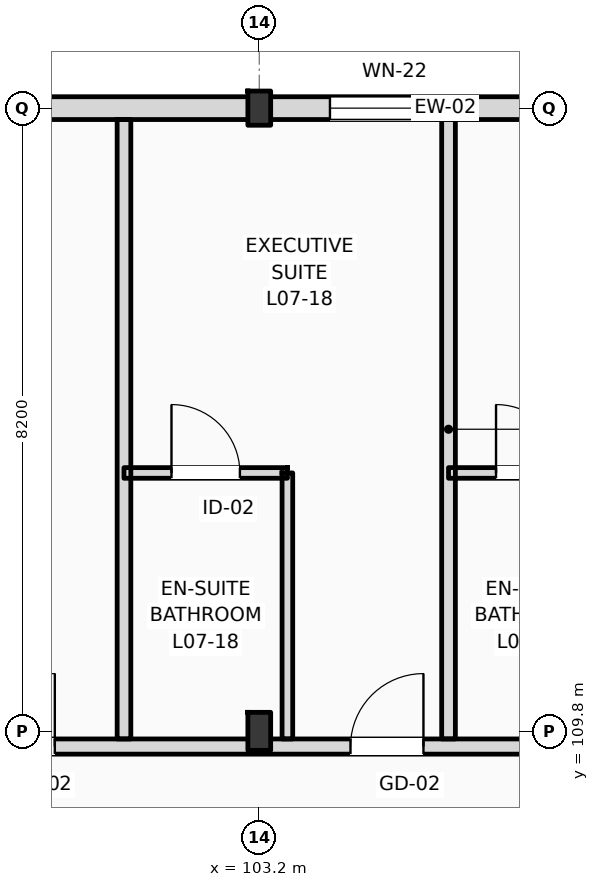
"""IFC4 building model, lengths in metres.
Left out: names, types, materials, properties, quantities, classifications, styles, units other than length and angle.
Written with IfcOpenShell. Run it as: python <this file> out.ifc"""

import sys

from ifc_helpers import new_model, si_unit, direction, frame, frame_2d, origin, origin_2d, place, context, subcontext, project, spatial, rectangle, i_section, extrude, element, fill, save


model = new_model("IFC4")
c1 = context("Model", 3, precision=1e-05, world=origin(), true_north=direction((0.0, 1.0)))
c2 = subcontext(c1, "Body", "Model", "MODEL_VIEW")
j1 = project(units=[si_unit("LENGTHUNIT", "METRE"), si_unit("PLANEANGLEUNIT", "RADIAN")], contexts=[c1])
p1 = place(None, origin())
s1 = spatial("IfcSite", under=j1, at=p1, CompositionType="ELEMENT")
p2 = place(p1, origin())
s2 = spatial("IfcBuilding", under=s1, at=p2, CompositionType="ELEMENT")
p3 = place(p2, frame((0.0, 0.0, 31.8)))
s3 = spatial("IfcBuildingStorey", under=s2, at=p3, CompositionType="ELEMENT", Elevation=31.8)
p4 = place(p3, frame((103.2, 109.8, 0.0), z_axis=(0.0, 0.0, 1.0), x_axis=(1.0, 0.0, 0.0)))
e1 = element("IfcColumn", 1, at=p4, inside=s3, PredefinedType="COLUMN", context=c2, shape_type="SweptSolid", body=[
    extrude(i_section(OverallWidth=0.3, OverallDepth=0.5, WebThickness=0.014, FlangeThickness=0.028, FilletRadius=0.027, at=origin_2d()), origin(), (0.0, 0.0, 1.0), 3.6),
])
p5 = place(p3, frame((103.2, 118.0, 0.0), z_axis=(0.0, 0.0, 1.0), x_axis=(1.0, 0.0, 0.0)))
e2 = element("IfcColumn", 2, at=p5, inside=s3, PredefinedType="COLUMN", context=c2, shape_type="SweptSolid", body=[
    extrude(i_section(OverallWidth=0.3, OverallDepth=0.45, WebThickness=0.014, FlangeThickness=0.026, FilletRadius=0.027, at=origin_2d()), origin(), (0.0, 0.0, 1.0), 3.6),
])
p6 = place(p3, frame((22.5, 118.0, 0.0), z_axis=(0.0, 0.0, 1.0), x_axis=(1.0, 0.0, 0.0)))
e3 = element("IfcWall", 3, at=p6, inside=s3, PredefinedType="STANDARD", context=c2, shape_type="SweptSolid", body=[
    extrude(rectangle(XDim=97.5, YDim=0.3, at=frame_2d((48.75, 0.0))), origin(), (0.0, 0.0, 1.0), 2.72),
])
p7 = place(p6, frame((3.61, 0.0, 0.9)))
e4 = element("IfcOpeningElement", 4, at=p7, cuts=e3, PredefinedType="OPENING", context=c2, shape_type="SweptSolid", body=[
    extrude(rectangle(XDim=1.1, YDim=1.64, at=frame_2d((0.55, 0.82))), frame((0.0, 0.16, 0.0), z_axis=(0.0, -1.0, 0.0), x_axis=(1.0, 0.0, 0.0)), (0.0, 0.0, 1.0), 0.32),
])
p8 = place(p6, frame((6.855, 0.0, 0.0)))
e5 = element("IfcOpeningElement", 5, at=p8, cuts=e3, PredefinedType="OPENING", context=c2, shape_type="SweptSolid", body=[
    extrude(rectangle(XDim=1.2, YDim=2.25, at=frame_2d((0.6, 1.125))), frame((0.0, 0.16, 0.0), z_axis=(0.0, -1.0, 0.0), x_axis=(1.0, 0.0, 0.0)), (0.0, 0.0, 1.0), 0.32),
])
p9 = place(p6, frame((11.405, 0.0, 0.9)))
e6 = element("IfcOpeningElement", 6, at=p9, cuts=e3, PredefinedType="OPENING", context=c2, shape_type="SweptSolid", body=[
    extrude(rectangle(XDim=2.1, YDim=1.64, at=frame_2d((1.05, 0.82))), frame((0.0, 0.16, 0.0), z_axis=(0.0, -1.0, 0.0), x_axis=(1.0, 0.0, 0.0)), (0.0, 0.0, 1.0), 0.32),
])
p10 = place(p6, frame((15.13, 0.0, 0.9)))
e7 = element("IfcOpeningElement", 7, at=p10, cuts=e3, PredefinedType="OPENING", context=c2, shape_type="SweptSolid", body=[
    extrude(rectangle(XDim=2.25, YDim=1.64, at=frame_2d((1.125, 0.82))), frame((0.0, 0.16, 0.0), z_axis=(0.0, -1.0, 0.0), x_axis=(1.0, 0.0, 0.0)), (0.0, 0.0, 1.0), 0.32),
])
p11 = place(p6, frame((21.53, 0.0, 0.0)))
e8 = element("IfcOpeningElement", 8, at=p11, cuts=e3, PredefinedType="OPENING", context=c2, shape_type="SweptSolid", body=[
    extrude(rectangle(XDim=1.2, YDim=2.25, at=frame_2d((0.6, 1.125))), frame((0.0, 0.16, 0.0), z_axis=(0.0, -1.0, 0.0), x_axis=(1.0, 0.0, 0.0)), (0.0, 0.0, 1.0), 0.32),
])
p12 = place(p6, frame((24.18, 0.0, 0.9)))
e9 = element("IfcOpeningElement", 9, at=p12, cuts=e3, PredefinedType="OPENING", context=c2, shape_type="SweptSolid", body=[
    extrude(rectangle(XDim=1.1, YDim=1.64, at=frame_2d((0.55, 0.82))), frame((0.0, 0.16, 0.0), z_axis=(0.0, -1.0, 0.0), x_axis=(1.0, 0.0, 0.0)), (0.0, 0.0, 1.0), 0.32),
])
p13 = place(p6, frame((29.105, 0.0, 0.9)))
e10 = element("IfcOpeningElement", 10, at=p13, cuts=e3, PredefinedType="OPENING", context=c2, shape_type="SweptSolid", body=[
    extrude(rectangle(XDim=2.7, YDim=1.64, at=frame_2d((1.35, 0.82))), frame((0.0, 0.16, 0.0), z_axis=(0.0, -1.0, 0.0), x_axis=(1.0, 0.0, 0.0)), (0.0, 0.0, 1.0), 0.32),
])
p14 = place(p6, frame((34.83, 0.0, 0.9)))
e11 = element("IfcOpeningElement", 11, at=p14, cuts=e3, PredefinedType="OPENING", context=c2, shape_type="SweptSolid", body=[
    extrude(rectangle(XDim=1.8, YDim=1.64, at=frame_2d((0.9, 0.82))), frame((0.0, 0.16, 0.0), z_axis=(0.0, -1.0, 0.0), x_axis=(1.0, 0.0, 0.0)), (0.0, 0.0, 1.0), 0.32),
])
p15 = place(p6, frame((38.525, 0.0, 0.0)))
e12 = element("IfcOpeningElement", 12, at=p15, cuts=e3, PredefinedType="OPENING", context=c2, shape_type="SweptSolid", body=[
    extrude(rectangle(XDim=1.2, YDim=2.25, at=frame_2d((0.6, 1.125))), frame((0.0, 0.16, 0.0), z_axis=(0.0, -1.0, 0.0), x_axis=(1.0, 0.0, 0.0)), (0.0, 0.0, 1.0), 0.32),
])
p16 = place(p6, frame((42.73, 0.0, 0.9)))
e13 = element("IfcOpeningElement", 13, at=p16, cuts=e3, PredefinedType="OPENING", context=c2, shape_type="SweptSolid", body=[
    extrude(rectangle(XDim=3.05, YDim=1.64, at=frame_2d((1.525, 0.82))), frame((0.0, 0.16, 0.0), z_axis=(0.0, -1.0, 0.0), x_axis=(1.0, 0.0, 0.0)), (0.0, 0.0, 1.0), 0.32),
])
p17 = place(p6, frame((47.155, 0.0, 0.9)))
e14 = element("IfcOpeningElement", 14, at=p17, cuts=e3, PredefinedType="OPENING", context=c2, shape_type="SweptSolid", body=[
    extrude(rectangle(XDim=1.35, YDim=1.64, at=frame_2d((0.675, 0.82))), frame((0.0, 0.16, 0.0), z_axis=(0.0, -1.0, 0.0), x_axis=(1.0, 0.0, 0.0)), (0.0, 0.0, 1.0), 0.32),
])
p18 = place(p6, frame((53.065, 0.0, 0.0)))
e15 = element("IfcOpeningElement", 15, at=p18, cuts=e3, PredefinedType="OPENING", context=c2, shape_type="SweptSolid", body=[
    extrude(rectangle(XDim=1.2, YDim=2.25, at=frame_2d((0.6, 1.125))), frame((0.0, 0.16, 0.0), z_axis=(0.0, -1.0, 0.0), x_axis=(1.0, 0.0, 0.0)), (0.0, 0.0, 1.0), 0.32),
])
p19 = place(p6, frame((58.2, 0.0, 0.9)))
e16 = element("IfcOpeningElement", 16, at=p19, cuts=e3, PredefinedType="OPENING", context=c2, shape_type="SweptSolid", body=[
    extrude(rectangle(XDim=1.8, YDim=1.64, at=frame_2d((0.9, 0.82))), frame((0.0, 0.16, 0.0), z_axis=(0.0, -1.0, 0.0), x_axis=(1.0, 0.0, 0.0)), (0.0, 0.0, 1.0), 0.32),
])
p20 = place(p6, frame((61.13, 0.0, 0.9)))
e17 = element("IfcOpeningElement", 17, at=p20, cuts=e3, PredefinedType="OPENING", context=c2, shape_type="SweptSolid", body=[
    extrude(rectangle(XDim=3.05, YDim=1.64, at=frame_2d((1.525, 0.82))), frame((0.0, 0.16, 0.0), z_axis=(0.0, -1.0, 0.0), x_axis=(1.0, 0.0, 0.0)), (0.0, 0.0, 1.0), 0.32),
])
p21 = place(p6, frame((67.93, 0.0, 0.0)))
e18 = element("IfcOpeningElement", 18, at=p21, cuts=e3, PredefinedType="OPENING", context=c2, shape_type="SweptSolid", body=[
    extrude(rectangle(XDim=1.2, YDim=2.25, at=frame_2d((0.6, 1.125))), frame((0.0, 0.16, 0.0), z_axis=(0.0, -1.0, 0.0), x_axis=(1.0, 0.0, 0.0)), (0.0, 0.0, 1.0), 0.32),
])
p22 = place(p6, frame((70.39, 0.0, 0.0)))
e19 = element("IfcOpeningElement", 19, at=p22, cuts=e3, PredefinedType="OPENING", context=c2, shape_type="SweptSolid", body=[
    extrude(rectangle(XDim=1.2, YDim=2.25, at=frame_2d((0.6, 1.125))), frame((0.0, 0.16, 0.0), z_axis=(0.0, -1.0, 0.0), x_axis=(1.0, 0.0, 0.0)), (0.0, 0.0, 1.0), 0.32),
])
p23 = place(p6, frame((75.905, 0.0, 0.9)))
e20 = element("IfcOpeningElement", 20, at=p23, cuts=e3, PredefinedType="OPENING", context=c2, shape_type="SweptSolid", body=[
    extrude(rectangle(XDim=1.1, YDim=1.5, at=frame_2d((0.55, 0.75))), frame((0.0, 0.16, 0.0), z_axis=(0.0, -1.0, 0.0), x_axis=(1.0, 0.0, 0.0)), (0.0, 0.0, 1.0), 0.32),
])
p24 = place(p6, frame((81.63, 0.0, 0.9)))
e21 = element("IfcOpeningElement", 21, at=p24, cuts=e3, PredefinedType="OPENING", context=c2, shape_type="SweptSolid", body=[
    extrude(rectangle(XDim=1.1, YDim=1.6, at=frame_2d((0.55, 0.8))), frame((0.0, 0.16, 0.0), z_axis=(0.0, -1.0, 0.0), x_axis=(1.0, 0.0, 0.0)), (0.0, 0.0, 1.0), 0.32),
])
p25 = place(p6, frame((84.955, 0.0, 0.9)))
e22 = element("IfcOpeningElement", 22, at=p25, cuts=e3, PredefinedType="OPENING", context=c2, shape_type="SweptSolid", body=[
    extrude(rectangle(XDim=1.4, YDim=1.64, at=frame_2d((0.7, 0.82))), frame((0.0, 0.16, 0.0), z_axis=(0.0, -1.0, 0.0), x_axis=(1.0, 0.0, 0.0)), (0.0, 0.0, 1.0), 0.32),
])
p26 = place(p6, frame((90.055, 0.0, 0.9)))
e23 = element("IfcOpeningElement", 23, at=p26, cuts=e3, PredefinedType="OPENING", context=c2, shape_type="SweptSolid", body=[
    extrude(rectangle(XDim=1.6, YDim=1.64, at=frame_2d((0.8, 0.82))), frame((0.0, 0.16, 0.0), z_axis=(0.0, -1.0, 0.0), x_axis=(1.0, 0.0, 0.0)), (0.0, 0.0, 1.0), 0.32),
])
p27 = place(p6, frame((93.87, 0.0, 0.9)))
e24 = element("IfcOpeningElement", 24, at=p27, cuts=e3, PredefinedType="OPENING", context=c2, shape_type="SweptSolid", body=[
    extrude(rectangle(XDim=1.75, YDim=1.64, at=frame_2d((0.875, 0.82))), frame((0.0, 0.16, 0.0), z_axis=(0.0, -1.0, 0.0), x_axis=(1.0, 0.0, 0.0)), (0.0, 0.0, 1.0), 0.32),
])
p28 = place(p3, frame((10.65, 109.6, 0.0), z_axis=(0.0, 0.0, 1.0), x_axis=(1.0, 0.0, 0.0)))
e25 = element("IfcWall", 25, at=p28, inside=s3, PredefinedType="PARTITIONING", context=c2, shape_type="SweptSolid", body=[
    extrude(rectangle(XDim=109.21, YDim=0.2, at=frame_2d((54.605, 0.0))), origin(), (0.0, 0.0, 1.0), 2.72),
])
p29 = place(p28, frame((15.825, 0.0, 0.0)))
e26 = element("IfcOpeningElement", 26, at=p29, cuts=e25, PredefinedType="OPENING", context=c2, shape_type="SweptSolid", body=[
    extrude(rectangle(XDim=1.02, YDim=2.2, at=frame_2d((0.51, 1.1))), frame((0.0, 0.11, 0.0), z_axis=(0.0, -1.0, 0.0), x_axis=(1.0, 0.0, 0.0)), (0.0, 0.0, 1.0), 0.22),
])
p30 = place(p28, frame((19.87, 0.0, 0.0)))
e27 = element("IfcOpeningElement", 27, at=p30, cuts=e25, PredefinedType="OPENING", context=c2, shape_type="SweptSolid", body=[
    extrude(rectangle(XDim=1.02, YDim=2.2, at=frame_2d((0.51, 1.1))), frame((0.0, 0.11, 0.0), z_axis=(0.0, -1.0, 0.0), x_axis=(1.0, 0.0, 0.0)), (0.0, 0.0, 1.0), 0.22),
])
p31 = place(p28, frame((24.47, 0.0, 0.0)))
e28 = element("IfcOpeningElement", 28, at=p31, cuts=e25, PredefinedType="OPENING", context=c2, shape_type="SweptSolid", body=[
    extrude(rectangle(XDim=1.02, YDim=2.2, at=frame_2d((0.51, 1.1))), frame((0.0, 0.11, 0.0), z_axis=(0.0, -1.0, 0.0), x_axis=(1.0, 0.0, 0.0)), (0.0, 0.0, 1.0), 0.22),
])
p32 = place(p28, frame((26.92, 0.0, 0.0)))
e29 = element("IfcOpeningElement", 29, at=p32, cuts=e25, PredefinedType="OPENING", context=c2, shape_type="SweptSolid", body=[
    extrude(rectangle(XDim=1.02, YDim=2.2, at=frame_2d((0.51, 1.1))), frame((0.0, 0.11, 0.0), z_axis=(0.0, -1.0, 0.0), x_axis=(1.0, 0.0, 0.0)), (0.0, 0.0, 1.0), 0.22),
])
p33 = place(p28, frame((33.7, 0.0, 0.0)))
e30 = element("IfcOpeningElement", 30, at=p33, cuts=e25, PredefinedType="OPENING", context=c2, shape_type="SweptSolid", body=[
    extrude(rectangle(XDim=0.96, YDim=2.2, at=frame_2d((0.48, 1.1))), frame((0.0, 0.11, 0.0), z_axis=(0.0, -1.0, 0.0), x_axis=(1.0, 0.0, 0.0)), (0.0, 0.0, 1.0), 0.22),
])
p34 = place(p28, frame((35.9, 0.0, 0.0)))
e31 = element("IfcOpeningElement", 31, at=p34, cuts=e25, PredefinedType="OPENING", context=c2, shape_type="SweptSolid", body=[
    extrude(rectangle(XDim=0.96, YDim=2.2, at=frame_2d((0.48, 1.1))), frame((0.0, 0.11, 0.0), z_axis=(0.0, -1.0, 0.0), x_axis=(1.0, 0.0, 0.0)), (0.0, 0.0, 1.0), 0.22),
])
p35 = place(p28, frame((42.9, 0.0, 0.0)))
e32 = element("IfcOpeningElement", 32, at=p35, cuts=e25, PredefinedType="OPENING", context=c2, shape_type="SweptSolid", body=[
    extrude(rectangle(XDim=0.96, YDim=2.2, at=frame_2d((0.48, 1.1))), frame((0.0, 0.11, 0.0), z_axis=(0.0, -1.0, 0.0), x_axis=(1.0, 0.0, 0.0)), (0.0, 0.0, 1.0), 0.22),
])
p36 = place(p28, frame((47.5, 0.0, 0.0)))
e33 = element("IfcOpeningElement", 33, at=p36, cuts=e25, PredefinedType="OPENING", context=c2, shape_type="SweptSolid", body=[
    extrude(rectangle(XDim=0.96, YDim=2.2, at=frame_2d((0.48, 1.1))), frame((0.0, 0.11, 0.0), z_axis=(0.0, -1.0, 0.0), x_axis=(1.0, 0.0, 0.0)), (0.0, 0.0, 1.0), 0.22),
])
p37 = place(p28, frame((49.95, 0.0, 0.0)))
e34 = element("IfcOpeningElement", 34, at=p37, cuts=e25, PredefinedType="OPENING", context=c2, shape_type="SweptSolid", body=[
    extrude(rectangle(XDim=0.96, YDim=2.2, at=frame_2d((0.48, 1.1))), frame((0.0, 0.11, 0.0), z_axis=(0.0, -1.0, 0.0), x_axis=(1.0, 0.0, 0.0)), (0.0, 0.0, 1.0), 0.22),
])
p38 = place(p28, frame((56.7, 0.0, 0.0)))
e35 = element("IfcOpeningElement", 35, at=p38, cuts=e25, PredefinedType="OPENING", context=c2, shape_type="SweptSolid", body=[
    extrude(rectangle(XDim=0.96, YDim=2.2, at=frame_2d((0.48, 1.1))), frame((0.0, 0.11, 0.0), z_axis=(0.0, -1.0, 0.0), x_axis=(1.0, 0.0, 0.0)), (0.0, 0.0, 1.0), 0.22),
])
p39 = place(p28, frame((59.15, 0.0, 0.0)))
e36 = element("IfcOpeningElement", 36, at=p39, cuts=e25, PredefinedType="OPENING", context=c2, shape_type="SweptSolid", body=[
    extrude(rectangle(XDim=0.96, YDim=2.2, at=frame_2d((0.48, 1.1))), frame((0.0, 0.11, 0.0), z_axis=(0.0, -1.0, 0.0), x_axis=(1.0, 0.0, 0.0)), (0.0, 0.0, 1.0), 0.22),
])
p40 = place(p28, frame((65.9, 0.0, 0.0)))
e37 = element("IfcOpeningElement", 37, at=p40, cuts=e25, PredefinedType="OPENING", context=c2, shape_type="SweptSolid", body=[
    extrude(rectangle(XDim=0.96, YDim=2.2, at=frame_2d((0.48, 1.1))), frame((0.0, 0.11, 0.0), z_axis=(0.0, -1.0, 0.0), x_axis=(1.0, 0.0, 0.0)), (0.0, 0.0, 1.0), 0.22),
])
p41 = place(p28, frame((70.5, 0.0, 0.0)))
e38 = element("IfcOpeningElement", 38, at=p41, cuts=e25, PredefinedType="OPENING", context=c2, shape_type="SweptSolid", body=[
    extrude(rectangle(XDim=0.96, YDim=2.2, at=frame_2d((0.48, 1.1))), frame((0.0, 0.11, 0.0), z_axis=(0.0, -1.0, 0.0), x_axis=(1.0, 0.0, 0.0)), (0.0, 0.0, 1.0), 0.22),
])
p42 = place(p28, frame((72.95, 0.0, 0.0)))
e39 = element("IfcOpeningElement", 39, at=p42, cuts=e25, PredefinedType="OPENING", context=c2, shape_type="SweptSolid", body=[
    extrude(rectangle(XDim=0.96, YDim=2.2, at=frame_2d((0.48, 1.1))), frame((0.0, 0.11, 0.0), z_axis=(0.0, -1.0, 0.0), x_axis=(1.0, 0.0, 0.0)), (0.0, 0.0, 1.0), 0.22),
])
p43 = place(p28, frame((79.7, 0.0, 0.0)))
e40 = element("IfcOpeningElement", 40, at=p43, cuts=e25, PredefinedType="OPENING", context=c2, shape_type="SweptSolid", body=[
    extrude(rectangle(XDim=0.96, YDim=2.2, at=frame_2d((0.48, 1.1))), frame((0.0, 0.11, 0.0), z_axis=(0.0, -1.0, 0.0), x_axis=(1.0, 0.0, 0.0)), (0.0, 0.0, 1.0), 0.22),
])
p44 = place(p28, frame((82.15, 0.0, 0.0)))
e41 = element("IfcOpeningElement", 41, at=p44, cuts=e25, PredefinedType="OPENING", context=c2, shape_type="SweptSolid", body=[
    extrude(rectangle(XDim=0.96, YDim=2.2, at=frame_2d((0.48, 1.1))), frame((0.0, 0.11, 0.0), z_axis=(0.0, -1.0, 0.0), x_axis=(1.0, 0.0, 0.0)), (0.0, 0.0, 1.0), 0.22),
])
p45 = place(p28, frame((88.9, 0.0, 0.0)))
e42 = element("IfcOpeningElement", 42, at=p45, cuts=e25, PredefinedType="OPENING", context=c2, shape_type="SweptSolid", body=[
    extrude(rectangle(XDim=0.96, YDim=2.2, at=frame_2d((0.48, 1.1))), frame((0.0, 0.11, 0.0), z_axis=(0.0, -1.0, 0.0), x_axis=(1.0, 0.0, 0.0)), (0.0, 0.0, 1.0), 0.22),
])
p46 = place(p28, frame((93.75, 0.0, 0.0)))
e43 = element("IfcOpeningElement", 43, at=p46, cuts=e25, PredefinedType="OPENING", context=c2, shape_type="SweptSolid", body=[
    extrude(rectangle(XDim=0.96, YDim=2.2, at=frame_2d((0.48, 1.1))), frame((0.0, 0.11, 0.0), z_axis=(0.0, -1.0, 0.0), x_axis=(1.0, 0.0, 0.0)), (0.0, 0.0, 1.0), 0.22),
])
p47 = place(p28, frame((98.1, 0.0, 0.0)))
e44 = element("IfcOpeningElement", 44, at=p47, cuts=e25, PredefinedType="OPENING", context=c2, shape_type="SweptSolid", body=[
    extrude(rectangle(XDim=0.96, YDim=2.2, at=frame_2d((0.48, 1.1))), frame((0.0, 0.11, 0.0), z_axis=(0.0, -1.0, 0.0), x_axis=(1.0, 0.0, 0.0)), (0.0, 0.0, 1.0), 0.22),
])
p48 = place(p28, frame((102.7, 0.0, 0.0)))
e45 = element("IfcOpeningElement", 45, at=p48, cuts=e25, PredefinedType="OPENING", context=c2, shape_type="SweptSolid", body=[
    extrude(rectangle(XDim=0.96, YDim=2.2, at=frame_2d((0.48, 1.1))), frame((0.0, 0.11, 0.0), z_axis=(0.0, -1.0, 0.0), x_axis=(1.0, 0.0, 0.0)), (0.0, 0.0, 1.0), 0.22),
])
p49 = place(p28, frame((105.04, 0.0, 0.0)))
e46 = element("IfcOpeningElement", 46, at=p49, cuts=e25, PredefinedType="OPENING", context=c2, shape_type="SweptSolid", body=[
    extrude(rectangle(XDim=0.96, YDim=2.2, at=frame_2d((0.48, 1.1))), frame((0.0, 0.11, 0.0), z_axis=(0.0, -1.0, 0.0), x_axis=(1.0, 0.0, 0.0)), (0.0, 0.0, 1.0), 0.22),
])
p50 = place(p28, frame((2.716, 0.0, 0.0)))
e47 = element("IfcOpeningElement", 47, at=p50, cuts=e25, PredefinedType="OPENING", context=c2, shape_type="SweptSolid", body=[
    extrude(rectangle(XDim=1.35, YDim=2.25, at=frame_2d((0.675, 1.125))), frame((0.0, 0.11, 0.0), z_axis=(0.0, -1.0, 0.0), x_axis=(1.0, 0.0, 0.0)), (0.0, 0.0, 1.0), 0.22),
])
p51 = place(p28, frame((6.65, 0.0, 0.0)))
e48 = element("IfcOpeningElement", 48, at=p51, cuts=e25, PredefinedType="OPENING", context=c2, shape_type="SweptSolid", body=[
    extrude(rectangle(XDim=1.35, YDim=2.25, at=frame_2d((0.675, 1.125))), frame((0.0, 0.11, 0.0), z_axis=(0.0, -1.0, 0.0), x_axis=(1.0, 0.0, 0.0)), (0.0, 0.0, 1.0), 0.22),
])
p52 = place(p28, frame((10.583, 0.0, 0.0)))
e49 = element("IfcOpeningElement", 49, at=p52, cuts=e25, PredefinedType="OPENING", context=c2, shape_type="SweptSolid", body=[
    extrude(rectangle(XDim=1.35, YDim=2.25, at=frame_2d((0.675, 1.125))), frame((0.0, 0.11, 0.0), z_axis=(0.0, -1.0, 0.0), x_axis=(1.0, 0.0, 0.0)), (0.0, 0.0, 1.0), 0.22),
])
for number, where, z_axis, x_axis in (
    (50, (101.42, 109.7, 0.0), (0.0, 0.0, 1.0), (0.0, 1.0, 0.0)),
    (51, (105.69, 109.7, 0.0), (0.0, 0.0, 1.0), (0.0, 1.0, 0.0)),
):
    element("IfcWall", number, at=place(p3, frame(where, z_axis=z_axis, x_axis=x_axis)), inside=s3, PredefinedType="PARTITIONING", context=c2, shape_type="SweptSolid", body=[
        extrude(rectangle(XDim=8.15, YDim=0.18, at=frame_2d((4.075, 0.0))), origin(), (0.0, 0.0, 1.0), 3.36),
    ])
p53 = place(p3, frame((103.57, 109.7, 0.0), z_axis=(0.0, 0.0, 1.0), x_axis=(0.0, 1.0, 0.0)))
e52 = element("IfcWall", 52, at=p53, inside=s3, PredefinedType="PARTITIONING", context=c2, shape_type="SweptSolid", body=[
    extrude(rectangle(XDim=3.5, YDim=0.14, at=frame_2d((1.75, 0.0))), origin(), (0.0, 0.0, 1.0), 3.36),
])
p54 = place(p3, frame((101.42, 113.2, 0.0), z_axis=(0.0, 0.0, 1.0), x_axis=(1.0, 0.0, 0.0)))
e53 = element("IfcWall", 53, at=p54, inside=s3, PredefinedType="PARTITIONING", context=c2, shape_type="SweptSolid", body=[
    extrude(rectangle(XDim=2.15, YDim=0.14, at=frame_2d((1.075, 0.0))), origin(), (0.0, 0.0, 1.0), 3.36),
])
p55 = place(p54, frame((0.625, 0.0, 0.0)))
e54 = element("IfcOpeningElement", 54, at=p55, cuts=e53, PredefinedType="OPENING", context=c2, shape_type="SweptSolid", body=[
    extrude(rectangle(XDim=0.9, YDim=2.1, at=frame_2d((0.45, 1.05))), frame((0.0, 0.08, 0.0), z_axis=(0.0, -1.0, 0.0), x_axis=(1.0, 0.0, 0.0)), (0.0, 0.0, 1.0), 0.16),
])
p56 = place(p3, frame((105.69, 113.2, 0.0), z_axis=(0.0, 0.0, 1.0), x_axis=(1.0, 0.0, 0.0)))
e55 = element("IfcWall", 55, at=p56, inside=s3, PredefinedType="PARTITIONING", context=c2, shape_type="SweptSolid", body=[
    extrude(rectangle(XDim=2.15, YDim=0.14, at=frame_2d((1.075, 0.0))), origin(), (0.0, 0.0, 1.0), 3.36),
])
p57 = place(p56, frame((0.625, 0.0, 0.0)))
e56 = element("IfcOpeningElement", 56, at=p57, cuts=e55, PredefinedType="OPENING", context=c2, shape_type="SweptSolid", body=[
    extrude(rectangle(XDim=0.9, YDim=2.1, at=frame_2d((0.45, 1.05))), frame((0.0, 0.08, 0.0), z_axis=(0.0, -1.0, 0.0), x_axis=(1.0, 0.0, 0.0)), (0.0, 0.0, 1.0), 0.16),
])
p58 = place(p24, origin())
e57 = element("IfcWindow", 57, at=p58, inside=s3, PartitioningType="DOUBLE_PANEL_VERTICAL", PredefinedType="WINDOW", context=c2, shape_type="SweptSolid", body=[
    extrude(rectangle(XDim=1.1, YDim=1.6, at=frame_2d((0.55, 0.8))), frame((0.0, 0.03, 0.0), z_axis=(0.0, -1.0, 0.0), x_axis=(1.0, 0.0, 0.0)), (0.0, 0.0, 1.0), 0.06),
])
fill(e21, e57)
p59 = place(p45, origin())
e58 = element("IfcDoor", 58, at=p59, inside=s3, OperationType="SINGLE_SWING_RIGHT", PredefinedType="DOOR", context=c2, shape_type="SweptSolid", body=[
    extrude(rectangle(XDim=0.96, YDim=2.2, at=frame_2d((0.48, 1.1))), frame((0.0, 0.025, 0.0), z_axis=(0.0, -1.0, 0.0), x_axis=(1.0, 0.0, 0.0)), (0.0, 0.0, 1.0), 0.05),
])
fill(e42, e58)
p60 = place(p46, origin())
e59 = element("IfcDoor", 59, at=p60, inside=s3, OperationType="SINGLE_SWING_RIGHT", PredefinedType="DOOR", context=c2, shape_type="SweptSolid", body=[
    extrude(rectangle(XDim=0.96, YDim=2.2, at=frame_2d((0.48, 1.1))), frame((0.0, 0.025, 0.0), z_axis=(0.0, -1.0, 0.0), x_axis=(1.0, 0.0, 0.0)), (0.0, 0.0, 1.0), 0.05),
])
fill(e43, e59)
p61 = place(p55, origin())
e60 = element("IfcDoor", 60, at=p61, inside=s3, OperationType="SINGLE_SWING_LEFT", PredefinedType="DOOR", context=c2, shape_type="SweptSolid", body=[
    extrude(rectangle(XDim=0.9, YDim=2.1, at=frame_2d((0.45, 1.05))), frame((0.0, 0.025, 0.0), z_axis=(0.0, -1.0, 0.0), x_axis=(1.0, 0.0, 0.0)), (0.0, 0.0, 1.0), 0.05),
])
fill(e54, e60)
p62 = place(p57, origin())
e61 = element("IfcDoor", 61, at=p62, inside=s3, OperationType="SINGLE_SWING_LEFT", PredefinedType="DOOR", context=c2, shape_type="SweptSolid", body=[
    extrude(rectangle(XDim=0.9, YDim=2.1, at=frame_2d((0.45, 1.05))), frame((0.0, 0.025, 0.0), z_axis=(0.0, -1.0, 0.0), x_axis=(1.0, 0.0, 0.0)), (0.0, 0.0, 1.0), 0.05),
])
fill(e56, e61)
save(model, sys.argv[1])
